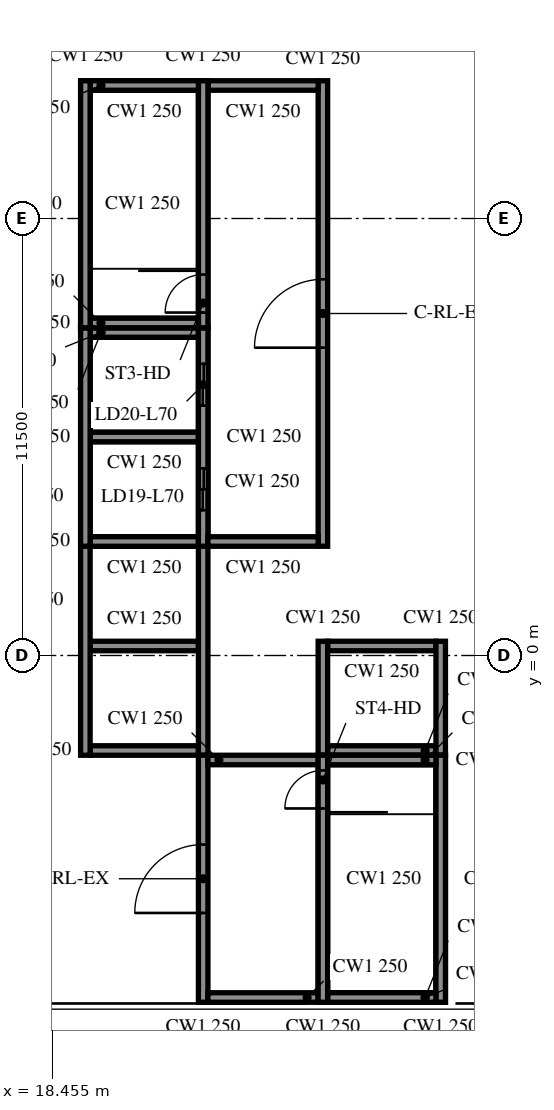
"""IFC4 building model, lengths in metres.
Left out: names, types, materials, properties, quantities, classifications, styles, units other than length and angle.
Written with IfcOpenShell. Run it as: python <this file> out.ifc"""

import sys

from ifc_helpers import new_model, si_unit, direction, frame, frame_2d, origin, place, context, subcontext, project, spatial, polyline, rectangle, outline, extrude, element, fill, save


model = new_model("IFC4")
c1 = context("Model", 3, precision=1e-05, world=origin(), true_north=direction((0.0, 1.0)))
c2 = subcontext(c1, "Body", "Model", "MODEL_VIEW")
j1 = project(units=[si_unit("LENGTHUNIT", "METRE"), si_unit("PLANEANGLEUNIT", "RADIAN")], contexts=[c1])
p1 = place(None, origin())
s1 = spatial("IfcSite", under=j1, at=p1, CompositionType="ELEMENT")
p2 = place(p1, origin())
s2 = spatial("IfcBuilding", under=s1, at=p2, CompositionType="ELEMENT")
p3 = place(p2, frame((0.0, 0.0, 289.7)))
s3 = spatial("IfcBuildingStorey", under=s2, at=p3, CompositionType="ELEMENT", Elevation=289.7)
p4 = place(p3, origin())
e1 = element("IfcWall", 1, at=p4, inside=s3, PredefinedType="USERDEFINED", context=c2, shape_type="SweptSolid", body=[
    extrude(outline(polyline([(20.25, -1.25), (20.25, 1.25), (17.75, 1.25), (17.75, -1.25), (20.25, -1.25)]), holes=[polyline([(20.1, -1.1), (20.1, 1.1), (17.9, 1.1), (17.9, -1.1), (20.1, -1.1)])]), origin(), (0.0, 0.0, 1.0), 4.0),
])
for number, where, z_axis, x_axis in (
    (2, (19.325, -2.625, -3.6), (0.0, 0.0, 1.0), (0.0, 1.0, 0.0)),
    (3, (22.425, -2.625, -3.6), (0.0, 0.0, 1.0), (0.0, 1.0, 0.0)),
):
    element("IfcWall", number, at=place(p3, frame(where, z_axis=z_axis, x_axis=x_axis)), inside=s3, PredefinedType="SOLIDWALL", context=c2, shape_type="SweptSolid", body=[
        extrude(rectangle(XDim=11.25, YDim=0.25, at=frame_2d((5.625, 0.0))), origin(), (0.0, 0.0, 1.0), 3.2),
    ])
for number, where, z_axis, x_axis in (
    (4, (19.45, -2.5, -3.6), (0.0, 0.0, 1.0), (1.0, 0.0, 0.0)),
    (5, (19.45, 0.25, -3.6), (0.0, 0.0, 1.0), (1.0, 0.0, 0.0)),
    (6, (19.45, 3.0, -3.6), (0.0, 0.0, 1.0), (1.0, 0.0, 0.0)),
    (7, (19.45, 5.75, -3.6), (0.0, 0.0, 1.0), (1.0, 0.0, 0.0)),
    (8, (19.45, 8.5, -3.6), (0.0, 0.0, 1.0), (1.0, 0.0, 0.0)),
):
    element("IfcWall", number, at=place(p3, frame(where, z_axis=z_axis, x_axis=x_axis)), inside=s3, PredefinedType="SOLIDWALL", context=c2, shape_type="SweptSolid", body=[
        extrude(rectangle(XDim=2.85, YDim=0.25, at=frame_2d((1.425, 0.0))), origin(), (0.0, 0.0, 1.0), 3.2),
    ])
for number, where, z_axis, x_axis in (
    (9, (28.675, -2.625, -3.6), (0.0, 0.0, 1.0), (0.0, 1.0, 0.0)),
    (10, (25.575, -2.625, -3.6), (0.0, 0.0, 1.0), (0.0, 1.0, 0.0)),
):
    element("IfcWall", number, at=place(p3, frame(where, z_axis=z_axis, x_axis=x_axis)), inside=s3, PredefinedType="SOLIDWALL", context=c2, shape_type="SweptSolid", body=[
        extrude(rectangle(XDim=3.0, YDim=0.25, at=frame_2d((1.5, 0.0))), origin(), (0.0, 0.0, 1.0), 3.2),
    ])
for number, where, z_axis, x_axis in (
    (11, (25.7, -2.5, -3.6), (0.0, 0.0, 1.0), (1.0, 0.0, 0.0)),
    (12, (25.7, 0.25, -3.6), (0.0, 0.0, 1.0), (1.0, 0.0, 0.0)),
):
    element("IfcWall", number, at=place(p3, frame(where, z_axis=z_axis, x_axis=x_axis)), inside=s3, PredefinedType="SOLIDWALL", context=c2, shape_type="SweptSolid", body=[
        extrude(rectangle(XDim=2.85, YDim=0.25, at=frame_2d((1.425, 0.0))), origin(), (0.0, 0.0, 1.0), 3.2),
    ])
for number, where, z_axis, x_axis in (
    (13, (19.325, 8.625, -3.6), (0.0, 0.0, 1.0), (0.0, 1.0, 0.0)),
    (14, (22.425, 8.625, -3.6), (0.0, 0.0, 1.0), (0.0, 1.0, 0.0)),
):
    element("IfcWall", number, at=place(p3, frame(where, z_axis=z_axis, x_axis=x_axis)), inside=s3, PredefinedType="SOLIDWALL", context=c2, shape_type="SweptSolid", body=[
        extrude(rectangle(XDim=6.5, YDim=0.25, at=frame_2d((3.25, 0.0))), origin(), (0.0, 0.0, 1.0), 3.2),
    ])
for number, where, z_axis, x_axis in (
    (15, (19.45, 8.75, -3.6), (0.0, 0.0, 1.0), (1.0, 0.0, 0.0)),
    (16, (19.45, 15.0, -3.6), (0.0, 0.0, 1.0), (1.0, 0.0, 0.0)),
):
    element("IfcWall", number, at=place(p3, frame(where, z_axis=z_axis, x_axis=x_axis)), inside=s3, PredefinedType="SOLIDWALL", context=c2, shape_type="SweptSolid", body=[
        extrude(rectangle(XDim=2.85, YDim=0.25, at=frame_2d((1.425, 0.0))), origin(), (0.0, 0.0, 1.0), 3.2),
    ])
p5 = place(p3, frame((19.325, 8.625, 0.0), z_axis=(0.0, 0.0, 1.0), x_axis=(0.0, 1.0, 0.0)))
e17 = element("IfcWall", 17, at=p5, inside=s3, PredefinedType="SOLIDWALL", context=c2, shape_type="SweptSolid", body=[
    extrude(rectangle(XDim=6.5, YDim=0.25, at=frame_2d((3.25, 0.0))), origin(), (0.0, 0.0, 1.0), 3.0),
])
p6 = place(p3, frame((22.425, 8.625, 0.0), z_axis=(0.0, 0.0, 1.0), x_axis=(0.0, 1.0, 0.0)))
e18 = element("IfcWall", 18, at=p6, inside=s3, PredefinedType="SOLIDWALL", context=c2, shape_type="SweptSolid", body=[
    extrude(rectangle(XDim=6.5, YDim=0.25, at=frame_2d((3.25, 0.0))), origin(), (0.0, 0.0, 1.0), 3.0),
])
p7 = place(p6, frame((0.4, 0.0, 0.0)))
e19 = element("IfcOpeningElement", 19, at=p7, cuts=e18, PredefinedType="OPENING", context=c2, shape_type="SweptSolid", body=[
    extrude(rectangle(XDim=1.0, YDim=2.1, at=frame_2d((0.5, 1.05))), frame((0.0, 0.135, 0.0), z_axis=(0.0, -1.0, 0.0), x_axis=(1.0, 0.0, 0.0)), (0.0, 0.0, 1.0), 0.27),
])
for number, where, z_axis, x_axis in (
    (20, (19.45, 8.75, 0.0), (0.0, 0.0, 1.0), (1.0, 0.0, 0.0)),
    (21, (19.45, 15.0, 0.0), (0.0, 0.0, 1.0), (1.0, 0.0, 0.0)),
):
    element("IfcWall", number, at=place(p3, frame(where, z_axis=z_axis, x_axis=x_axis)), inside=s3, PredefinedType="SOLIDWALL", context=c2, shape_type="SweptSolid", body=[
        extrude(rectangle(XDim=2.85, YDim=0.25, at=frame_2d((1.425, 0.0))), origin(), (0.0, 0.0, 1.0), 3.0),
    ])
for number, where, z_axis, x_axis in (
    (22, (25.575, -9.125, -3.6), (0.0, 0.0, 1.0), (0.0, 1.0, 0.0)),
    (23, (28.675, -9.125, -3.6), (0.0, 0.0, 1.0), (0.0, 1.0, 0.0)),
):
    element("IfcWall", number, at=place(p3, frame(where, z_axis=z_axis, x_axis=x_axis)), inside=s3, PredefinedType="SOLIDWALL", context=c2, shape_type="SweptSolid", body=[
        extrude(rectangle(XDim=6.5, YDim=0.25, at=frame_2d((3.25, 0.0))), origin(), (0.0, 0.0, 1.0), 3.2),
    ])
for number, where, z_axis, x_axis in (
    (24, (25.7, -9.0, -3.6), (0.0, 0.0, 1.0), (1.0, 0.0, 0.0)),
    (25, (25.7, -2.75, -3.6), (0.0, 0.0, 1.0), (1.0, 0.0, 0.0)),
):
    element("IfcWall", number, at=place(p3, frame(where, z_axis=z_axis, x_axis=x_axis)), inside=s3, PredefinedType="SOLIDWALL", context=c2, shape_type="SweptSolid", body=[
        extrude(rectangle(XDim=2.85, YDim=0.25, at=frame_2d((1.425, 0.0))), origin(), (0.0, 0.0, 1.0), 3.2),
    ])
p8 = place(p3, frame((25.575, -9.125, 0.0), z_axis=(0.0, 0.0, 1.0), x_axis=(0.0, 1.0, 0.0)))
e26 = element("IfcWall", 26, at=p8, inside=s3, PredefinedType="SOLIDWALL", context=c2, shape_type="SweptSolid", body=[
    extrude(rectangle(XDim=6.5, YDim=0.25, at=frame_2d((3.25, 0.0))), origin(), (0.0, 0.0, 1.0), 3.0),
])
p9 = place(p8, frame((5.1, 0.0, 0.0)))
e27 = element("IfcOpeningElement", 27, at=p9, cuts=e26, PredefinedType="OPENING", context=c2, shape_type="SweptSolid", body=[
    extrude(rectangle(XDim=1.0, YDim=2.1, at=frame_2d((0.5, 1.05))), frame((0.0, 0.135, 0.0), z_axis=(0.0, -1.0, 0.0), x_axis=(1.0, 0.0, 0.0)), (0.0, 0.0, 1.0), 0.27),
])
p10 = place(p3, frame((28.675, -9.125, 0.0), z_axis=(0.0, 0.0, 1.0), x_axis=(0.0, 1.0, 0.0)))
e28 = element("IfcWall", 28, at=p10, inside=s3, PredefinedType="SOLIDWALL", context=c2, shape_type="SweptSolid", body=[
    extrude(rectangle(XDim=6.5, YDim=0.25, at=frame_2d((3.25, 0.0))), origin(), (0.0, 0.0, 1.0), 3.0),
])
for number, where, z_axis, x_axis in (
    (29, (25.7, -9.0, 0.0), (0.0, 0.0, 1.0), (1.0, 0.0, 0.0)),
    (30, (25.7, -2.75, 0.0), (0.0, 0.0, 1.0), (1.0, 0.0, 0.0)),
):
    element("IfcWall", number, at=place(p3, frame(where, z_axis=z_axis, x_axis=x_axis)), inside=s3, PredefinedType="SOLIDWALL", context=c2, shape_type="SweptSolid", body=[
        extrude(rectangle(XDim=2.85, YDim=0.25, at=frame_2d((1.425, 0.0))), origin(), (0.0, 0.0, 1.0), 3.0),
    ])
p11 = place(p3, frame((22.425, -9.125, 0.0), z_axis=(0.0, 0.0, 1.0), x_axis=(0.0, 1.0, 0.0)))
e31 = element("IfcWall", 31, at=p11, inside=s3, PredefinedType="SOLIDWALL", context=c2, shape_type="SweptSolid", body=[
    extrude(rectangle(XDim=6.5, YDim=0.25, at=frame_2d((3.25, 0.0))), origin(), (0.0, 0.0, 1.0), 3.0),
])
p12 = place(p11, frame((2.35, 0.0, 0.0)))
e32 = element("IfcOpeningElement", 32, at=p12, cuts=e31, PredefinedType="OPENING", context=c2, shape_type="SweptSolid", body=[
    extrude(rectangle(XDim=1.8, YDim=2.1, at=frame_2d((0.9, 1.05))), frame((0.0, 0.135, 0.0), z_axis=(0.0, -1.0, 0.0), x_axis=(1.0, 0.0, 0.0)), (0.0, 0.0, 1.0), 0.27),
])
for number, where, z_axis, x_axis in (
    (33, (22.55, -9.0, 0.0), (0.0, 0.0, 1.0), (1.0, 0.0, 0.0)),
    (34, (22.55, -2.75, 0.0), (0.0, 0.0, 1.0), (1.0, 0.0, 0.0)),
):
    element("IfcWall", number, at=place(p3, frame(where, z_axis=z_axis, x_axis=x_axis)), inside=s3, PredefinedType="SOLIDWALL", context=c2, shape_type="SweptSolid", body=[
        extrude(rectangle(XDim=2.9, YDim=0.25, at=frame_2d((1.45, 0.0))), origin(), (0.0, 0.0, 1.0), 3.0),
    ])
p13 = place(p3, frame((19.325, 2.875, 0.0), z_axis=(0.0, 0.0, 1.0), x_axis=(0.0, 1.0, 0.0)))
e35 = element("IfcWall", 35, at=p13, inside=s3, PredefinedType="SOLIDWALL", context=c2, shape_type="SweptSolid", body=[
    extrude(rectangle(XDim=5.75, YDim=0.25, at=frame_2d((2.875, 0.0))), origin(), (0.0, 0.0, 1.0), 5.2),
])
p14 = place(p3, frame((22.425, 2.875, 0.0), z_axis=(0.0, 0.0, 1.0), x_axis=(0.0, 1.0, 0.0)))
e36 = element("IfcWall", 36, at=p14, inside=s3, PredefinedType="SOLIDWALL", context=c2, shape_type="SweptSolid", body=[
    extrude(rectangle(XDim=5.75, YDim=0.25, at=frame_2d((2.875, 0.0))), origin(), (0.0, 0.0, 1.0), 5.2),
])
p15 = place(p14, frame((0.95, 0.0, 0.0)))
e37 = element("IfcOpeningElement", 37, at=p15, cuts=e36, PredefinedType="OPENING", context=c2, shape_type="SweptSolid", body=[
    extrude(rectangle(XDim=1.1, YDim=2.1, at=frame_2d((0.55, 1.05))), frame((0.0, 0.135, 0.0), z_axis=(0.0, -1.0, 0.0), x_axis=(1.0, 0.0, 0.0)), (0.0, 0.0, 1.0), 0.27),
])
p16 = place(p14, frame((3.7, 0.0, 0.0)))
e38 = element("IfcOpeningElement", 38, at=p16, cuts=e36, PredefinedType="OPENING", context=c2, shape_type="SweptSolid", body=[
    extrude(rectangle(XDim=1.1, YDim=2.1, at=frame_2d((0.55, 1.05))), frame((0.0, 0.135, 0.0), z_axis=(0.0, -1.0, 0.0), x_axis=(1.0, 0.0, 0.0)), (0.0, 0.0, 1.0), 0.27),
])
for number, where, z_axis, x_axis in (
    (39, (19.45, 3.0, 0.0), (0.0, 0.0, 1.0), (1.0, 0.0, 0.0)),
    (40, (19.45, 5.75, 0.0), (0.0, 0.0, 1.0), (1.0, 0.0, 0.0)),
    (41, (19.45, 8.5, 0.0), (0.0, 0.0, 1.0), (1.0, 0.0, 0.0)),
):
    element("IfcWall", number, at=place(p3, frame(where, z_axis=z_axis, x_axis=x_axis)), inside=s3, PredefinedType="SOLIDWALL", context=c2, shape_type="SweptSolid", body=[
        extrude(rectangle(XDim=2.85, YDim=0.25, at=frame_2d((1.425, 0.0))), origin(), (0.0, 0.0, 1.0), 5.2),
    ])
for number, where, z_axis, x_axis in (
    (42, (22.55, 3.0, 0.0), (0.0, 0.0, 1.0), (1.0, 0.0, 0.0)),
    (43, (22.55, 15.0, 0.0), (0.0, 0.0, 1.0), (1.0, 0.0, 0.0)),
):
    element("IfcWall", number, at=place(p3, frame(where, z_axis=z_axis, x_axis=x_axis)), inside=s3, PredefinedType="SOLIDWALL", context=c2, shape_type="SweptSolid", body=[
        extrude(rectangle(XDim=2.9, YDim=0.25, at=frame_2d((1.45, 0.0))), origin(), (0.0, 0.0, 1.0), 3.0),
    ])
p17 = place(p3, frame((25.575, 2.875, 0.0), z_axis=(0.0, 0.0, 1.0), x_axis=(0.0, 1.0, 0.0)))
e44 = element("IfcWall", 44, at=p17, inside=s3, PredefinedType="SOLIDWALL", context=c2, shape_type="SweptSolid", body=[
    extrude(rectangle(XDim=12.25, YDim=0.25, at=frame_2d((6.125, 0.0))), origin(), (0.0, 0.0, 1.0), 3.0),
])
p18 = place(p17, frame((5.225, 0.0, 0.0)))
e45 = element("IfcOpeningElement", 45, at=p18, cuts=e44, PredefinedType="OPENING", context=c2, shape_type="SweptSolid", body=[
    extrude(rectangle(XDim=1.8, YDim=2.1, at=frame_2d((0.9, 1.05))), frame((0.0, 0.135, 0.0), z_axis=(0.0, -1.0, 0.0), x_axis=(1.0, 0.0, 0.0)), (0.0, 0.0, 1.0), 0.27),
])
p19 = place(p7, origin())
e46 = element("IfcDoor", 46, at=p19, inside=s3, OperationType="SINGLE_SWING_LEFT", PredefinedType="DOOR", context=c2, shape_type="SweptSolid", body=[
    extrude(rectangle(XDim=1.0, YDim=2.1, at=frame_2d((0.5, 1.05))), frame((0.0, 0.025, 0.0), z_axis=(0.0, -1.0, 0.0), x_axis=(1.0, 0.0, 0.0)), (0.0, 0.0, 1.0), 0.05),
])
fill(e19, e46)
p20 = place(p9, origin())
e47 = element("IfcDoor", 47, at=p20, inside=s3, OperationType="SINGLE_SWING_LEFT", PredefinedType="DOOR", context=c2, shape_type="SweptSolid", body=[
    extrude(rectangle(XDim=1.0, YDim=2.1, at=frame_2d((0.5, 1.05))), frame((0.0, 0.025, 0.0), z_axis=(0.0, -1.0, 0.0), x_axis=(1.0, 0.0, 0.0)), (0.0, 0.0, 1.0), 0.05),
])
fill(e27, e47)
p21 = place(p12, origin())
e48 = element("IfcDoor", 48, at=p21, inside=s3, OperationType="DOUBLE_DOOR_SINGLE_SWING", PredefinedType="DOOR", context=c2, shape_type="SweptSolid", body=[
    extrude(rectangle(XDim=1.8, YDim=2.1, at=frame_2d((0.9, 1.05))), frame((0.0, 0.025, 0.0), z_axis=(0.0, -1.0, 0.0), x_axis=(1.0, 0.0, 0.0)), (0.0, 0.0, 1.0), 0.05),
])
fill(e32, e48)
p22 = place(p15, origin())
e49 = element("IfcDoor", 49, at=p22, inside=s3, OperationType="DOUBLE_DOOR_SLIDING", PredefinedType="DOOR", context=c2, shape_type="SweptSolid", body=[
    extrude(rectangle(XDim=1.1, YDim=2.1, at=frame_2d((0.55, 1.05))), frame((0.0, 0.025, 0.0), z_axis=(0.0, -1.0, 0.0), x_axis=(1.0, 0.0, 0.0)), (0.0, 0.0, 1.0), 0.05),
])
fill(e37, e49)
p23 = place(p16, origin())
e50 = element("IfcDoor", 50, at=p23, inside=s3, OperationType="DOUBLE_DOOR_SLIDING", PredefinedType="DOOR", context=c2, shape_type="SweptSolid", body=[
    extrude(rectangle(XDim=1.1, YDim=2.1, at=frame_2d((0.55, 1.05))), frame((0.0, 0.025, 0.0), z_axis=(0.0, -1.0, 0.0), x_axis=(1.0, 0.0, 0.0)), (0.0, 0.0, 1.0), 0.05),
])
fill(e38, e50)
p24 = place(p18, origin())
e51 = element("IfcDoor", 51, at=p24, inside=s3, OperationType="DOUBLE_DOOR_SINGLE_SWING", PredefinedType="DOOR", context=c2, shape_type="SweptSolid", body=[
    extrude(rectangle(XDim=1.8, YDim=2.1, at=frame_2d((0.9, 1.05))), frame((0.0, 0.025, 0.0), z_axis=(0.0, -1.0, 0.0), x_axis=(1.0, 0.0, 0.0)), (0.0, 0.0, 1.0), 0.05),
])
fill(e45, e51)
save(model, sys.argv[1])
